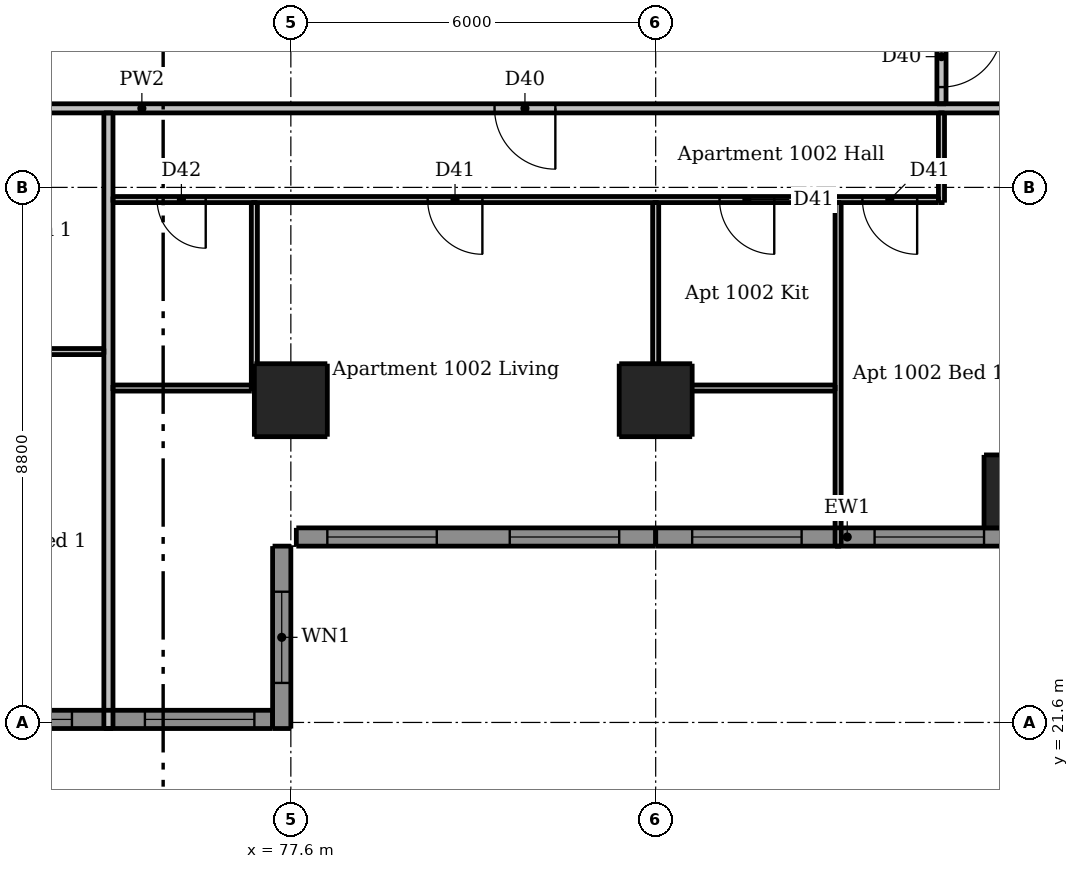
"""IFC4 building model, lengths in metres.
Left out: names, types, materials, properties, quantities, classifications, styles, units other than length and angle.
Written with IfcOpenShell. Run it as: python <this file> out.ifc"""

import sys

from ifc_helpers import new_model, si_unit, direction, frame, frame_2d, origin, origin_2d, place, context, subcontext, project, spatial, rectangle, extrude, element, fill, save


model = new_model("IFC4")
c1 = context("Model", 3, precision=1e-05, world=origin(), true_north=direction((0.0, 1.0)))
c2 = subcontext(c1, "Body", "Model", "MODEL_VIEW")
j1 = project(units=[si_unit("LENGTHUNIT", "METRE"), si_unit("PLANEANGLEUNIT", "RADIAN")], contexts=[c1])
p1 = place(None, origin())
s1 = spatial("IfcSite", under=j1, at=p1, CompositionType="ELEMENT")
p2 = place(p1, origin())
s2 = spatial("IfcBuilding", under=s1, at=p2, CompositionType="ELEMENT")
p3 = place(p2, frame((0.0, 0.0, 40.0)))
s3 = spatial("IfcBuildingStorey", under=s2, at=p3, CompositionType="ELEMENT", Elevation=40.0)
for number, where, z_axis, x_axis in (
    (1, (77.6, 26.9, 0.0), (0.0, 0.0, 1.0), (1.0, 0.0, 0.0)),
    (2, (83.6, 26.9, 0.0), (0.0, 0.0, 1.0), (1.0, 0.0, 0.0)),
    (3, (89.6, 25.4, 0.0), (0.0, 0.0, 1.0), (1.0, 0.0, 0.0)),
):
    element("IfcColumn", number, at=place(p3, frame(where, z_axis=z_axis, x_axis=x_axis)), inside=s3, PredefinedType="COLUMN", context=c2, shape_type="SweptSolid", body=[
        extrude(rectangle(XDim=1.2, YDim=1.2, at=origin_2d()), origin(), (0.0, 0.0, 1.0), 3.05),
    ])
p4 = place(p3, frame((77.45, 21.5, 0.0), z_axis=(0.0, 0.0, 1.0), x_axis=(0.0, 1.0, 0.0)))
e4 = element("IfcWall", 4, at=p4, inside=s3, PredefinedType="SOLIDWALL", context=c2, shape_type="SweptSolid", body=[
    extrude(rectangle(XDim=3.0, YDim=0.3, at=frame_2d((1.5, 0.0))), origin(), (0.0, 0.0, 1.0), 3.05),
])
p5 = place(p4, frame((0.75, 0.0, 0.9)))
e5 = element("IfcOpeningElement", 5, at=p5, cuts=e4, PredefinedType="OPENING", context=c2, shape_type="SweptSolid", body=[
    extrude(rectangle(XDim=1.5, YDim=1.5, at=frame_2d((0.75, 0.75))), frame((0.0, 0.16, 0.0), z_axis=(0.0, -1.0, 0.0), x_axis=(1.0, 0.0, 0.0)), (0.0, 0.0, 1.0), 0.32),
])
p6 = place(p3, frame((71.6, 21.65, 0.0), z_axis=(0.0, 0.0, 1.0), x_axis=(1.0, 0.0, 0.0)))
e6 = element("IfcWall", 6, at=p6, inside=s3, PredefinedType="SOLIDWALL", context=c2, shape_type="SweptSolid", body=[
    extrude(rectangle(XDim=5.7, YDim=0.3, at=frame_2d((2.85, 0.0))), origin(), (0.0, 0.0, 1.0), 3.05),
])
p7 = place(p6, frame((0.6, 0.0, 0.15)))
e7 = element("IfcOpeningElement", 7, at=p7, cuts=e6, PredefinedType="OPENING", context=c2, shape_type="SweptSolid", body=[
    extrude(rectangle(XDim=1.8, YDim=2.1, at=frame_2d((0.9, 1.05))), frame((0.0, 0.16, 0.0), z_axis=(0.0, -1.0, 0.0), x_axis=(1.0, 0.0, 0.0)), (0.0, 0.0, 1.0), 0.32),
])
p8 = place(p6, frame((3.6, 0.0, 0.15)))
e8 = element("IfcOpeningElement", 8, at=p8, cuts=e6, PredefinedType="OPENING", context=c2, shape_type="SweptSolid", body=[
    extrude(rectangle(XDim=1.8, YDim=2.1, at=frame_2d((0.9, 1.05))), frame((0.0, 0.16, 0.0), z_axis=(0.0, -1.0, 0.0), x_axis=(1.0, 0.0, 0.0)), (0.0, 0.0, 1.0), 0.32),
])
p9 = place(p3, frame((77.69, 24.65, 0.0), z_axis=(0.0, 0.0, 1.0), x_axis=(1.0, 0.0, 0.0)))
e9 = element("IfcWall", 9, at=p9, inside=s3, PredefinedType="SOLIDWALL", context=c2, shape_type="SweptSolid", body=[
    extrude(rectangle(XDim=5.91, YDim=0.3, at=frame_2d((2.955, 0.0))), origin(), (0.0, 0.0, 1.0), 3.05),
])
p10 = place(p9, frame((0.51, 0.0, 0.15)))
e10 = element("IfcOpeningElement", 10, at=p10, cuts=e9, PredefinedType="OPENING", context=c2, shape_type="SweptSolid", body=[
    extrude(rectangle(XDim=1.8, YDim=2.1, at=frame_2d((0.9, 1.05))), frame((0.0, 0.16, 0.0), z_axis=(0.0, -1.0, 0.0), x_axis=(1.0, 0.0, 0.0)), (0.0, 0.0, 1.0), 0.32),
])
p11 = place(p9, frame((3.51, 0.0, 0.15)))
e11 = element("IfcOpeningElement", 11, at=p11, cuts=e9, PredefinedType="OPENING", context=c2, shape_type="SweptSolid", body=[
    extrude(rectangle(XDim=1.8, YDim=2.1, at=frame_2d((0.9, 1.05))), frame((0.0, 0.16, 0.0), z_axis=(0.0, -1.0, 0.0), x_axis=(1.0, 0.0, 0.0)), (0.0, 0.0, 1.0), 0.32),
])
p12 = place(p3, frame((83.6, 24.65, 0.0), z_axis=(0.0, 0.0, 1.0), x_axis=(1.0, 0.0, 0.0)))
e12 = element("IfcWall", 12, at=p12, inside=s3, PredefinedType="SOLIDWALL", context=c2, shape_type="SweptSolid", body=[
    extrude(rectangle(XDim=6.3, YDim=0.3, at=frame_2d((3.15, 0.0))), origin(), (0.0, 0.0, 1.0), 3.05),
])
p13 = place(p12, frame((0.6, 0.0, 0.15)))
e13 = element("IfcOpeningElement", 13, at=p13, cuts=e12, PredefinedType="OPENING", context=c2, shape_type="SweptSolid", body=[
    extrude(rectangle(XDim=1.8, YDim=2.1, at=frame_2d((0.9, 1.05))), frame((0.0, 0.16, 0.0), z_axis=(0.0, -1.0, 0.0), x_axis=(1.0, 0.0, 0.0)), (0.0, 0.0, 1.0), 0.32),
])
p14 = place(p12, frame((3.6, 0.0, 0.15)))
e14 = element("IfcOpeningElement", 14, at=p14, cuts=e12, PredefinedType="OPENING", context=c2, shape_type="SweptSolid", body=[
    extrude(rectangle(XDim=1.8, YDim=2.1, at=frame_2d((0.9, 1.05))), frame((0.0, 0.16, 0.0), z_axis=(0.0, -1.0, 0.0), x_axis=(1.0, 0.0, 0.0)), (0.0, 0.0, 1.0), 0.32),
])
p15 = place(p3, frame((77.0, 27.05, 0.0), z_axis=(0.0, 0.0, 1.0), x_axis=(0.0, 1.0, 0.0)))
e15 = element("IfcWall", 15, at=p15, inside=s3, PredefinedType="PARTITIONING", context=c2, shape_type="SweptSolid", body=[
    extrude(rectangle(XDim=3.1, YDim=0.1, at=frame_2d((1.55, 0.0))), origin(), (0.0, 0.0, 1.0), 3.05),
])
p16 = place(p3, frame((83.6, 27.05, 0.0), z_axis=(0.0, 0.0, 1.0), x_axis=(0.0, 1.0, 0.0)))
e16 = element("IfcWall", 16, at=p16, inside=s3, PredefinedType="PARTITIONING", context=c2, shape_type="SweptSolid", body=[
    extrude(rectangle(XDim=3.1, YDim=0.1, at=frame_2d((1.55, 0.0))), origin(), (0.0, 0.0, 1.0), 2.647),
])
p17 = place(p3, frame((86.6, 24.5, 0.0), z_axis=(0.0, 0.0, 1.0), x_axis=(0.0, 1.0, 0.0)))
e17 = element("IfcWall", 17, at=p17, inside=s3, PredefinedType="PARTITIONING", context=c2, shape_type="SweptSolid", body=[
    extrude(rectangle(XDim=5.65, YDim=0.1, at=frame_2d((2.825, 0.0))), origin(), (0.0, 0.0, 1.0), 3.05),
])
p18 = place(p3, frame((88.3, 30.15, 0.0), z_axis=(0.0, 0.0, 1.0), x_axis=(0.0, 1.0, 0.0)))
e18 = element("IfcWall", 18, at=p18, inside=s3, PredefinedType="PARTITIONING", context=c2, shape_type="SweptSolid", body=[
    extrude(rectangle(XDim=1.475, YDim=0.1, at=frame_2d((0.738, 0.0))), origin(), (0.0, 0.0, 1.0), 3.05),
])
p19 = place(p3, frame((88.25, 30.2, 0.0), z_axis=(0.0, 0.0, 1.0), x_axis=(-1.0, 0.0, 0.0)))
e19 = element("IfcWall", 19, at=p19, inside=s3, PredefinedType="PARTITIONING", context=c2, shape_type="SweptSolid", body=[
    extrude(rectangle(XDim=13.575, YDim=0.1, at=frame_2d((6.788, 0.0))), origin(), (0.0, 0.0, 1.0), 3.05),
])
p20 = place(p19, frame((7.5, 0.0, 0.0)))
e20 = element("IfcOpeningElement", 20, at=p20, cuts=e19, PredefinedType="OPENING", context=c2, shape_type="SweptSolid", body=[
    extrude(rectangle(XDim=0.9, YDim=2.1, at=frame_2d((0.45, 1.05))), frame((0.0, 0.06, 0.0), z_axis=(0.0, -1.0, 0.0), x_axis=(1.0, 0.0, 0.0)), (0.0, 0.0, 1.0), 0.12),
])
p21 = place(p19, frame((2.7, 0.0, 0.0)))
e21 = element("IfcOpeningElement", 21, at=p21, cuts=e19, PredefinedType="OPENING", context=c2, shape_type="SweptSolid", body=[
    extrude(rectangle(XDim=0.9, YDim=2.1, at=frame_2d((0.45, 1.05))), frame((0.0, 0.06, 0.0), z_axis=(0.0, -1.0, 0.0), x_axis=(1.0, 0.0, 0.0)), (0.0, 0.0, 1.0), 0.12),
])
p22 = place(p19, frame((0.35, 0.0, 0.0)))
e22 = element("IfcOpeningElement", 22, at=p22, cuts=e19, PredefinedType="OPENING", context=c2, shape_type="SweptSolid", body=[
    extrude(rectangle(XDim=0.9, YDim=2.1, at=frame_2d((0.45, 1.05))), frame((0.0, 0.06, 0.0), z_axis=(0.0, -1.0, 0.0), x_axis=(1.0, 0.0, 0.0)), (0.0, 0.0, 1.0), 0.12),
])
p23 = place(p19, frame((12.05, 0.0, 0.0)))
e23 = element("IfcOpeningElement", 23, at=p23, cuts=e19, PredefinedType="OPENING", context=c2, shape_type="SweptSolid", body=[
    extrude(rectangle(XDim=0.8, YDim=2.1, at=frame_2d((0.4, 1.05))), frame((0.0, 0.06, 0.0), z_axis=(0.0, -1.0, 0.0), x_axis=(1.0, 0.0, 0.0)), (0.0, 0.0, 1.0), 0.12),
])
p24 = place(p3, frame((68.45, 27.7, 0.0), z_axis=(0.0, 0.0, 1.0), x_axis=(1.0, 0.0, 0.0)))
e24 = element("IfcWall", 24, at=p24, inside=s3, PredefinedType="PARTITIONING", context=c2, shape_type="SweptSolid", body=[
    extrude(rectangle(XDim=6.075, YDim=0.1, at=frame_2d((3.038, 0.0))), origin(), (0.0, 0.0, 1.0), 3.05),
])
p25 = place(p24, frame((3.85, 0.0, 0.0)))
e25 = element("IfcOpeningElement", 25, at=p25, cuts=e24, PredefinedType="OPENING", context=c2, shape_type="SweptSolid", body=[
    extrude(rectangle(XDim=0.8, YDim=2.1, at=frame_2d((0.4, 1.05))), frame((0.0, 0.06, 0.0), z_axis=(0.0, -1.0, 0.0), x_axis=(1.0, 0.0, 0.0)), (0.0, 0.0, 1.0), 0.12),
])
p26 = place(p3, frame((74.675, 27.1, 0.0), z_axis=(0.0, 0.0, 1.0), x_axis=(1.0, 0.0, 0.0)))
e26 = element("IfcWall", 26, at=p26, inside=s3, PredefinedType="PARTITIONING", context=c2, shape_type="SweptSolid", body=[
    extrude(rectangle(XDim=2.275, YDim=0.1, at=frame_2d((1.137, 0.0))), origin(), (0.0, 0.0, 1.0), 3.05),
])
p27 = place(p3, frame((83.65, 27.1, 0.0), z_axis=(0.0, 0.0, 1.0), x_axis=(1.0, 0.0, 0.0)))
e27 = element("IfcWall", 27, at=p27, inside=s3, PredefinedType="PARTITIONING", context=c2, shape_type="SweptSolid", body=[
    extrude(rectangle(XDim=2.9, YDim=0.1, at=frame_2d((1.45, 0.0))), origin(), (0.0, 0.0, 1.0), 3.05),
])
p28 = place(p3, frame((74.6, 21.5, 0.0), z_axis=(0.0, 0.0, 1.0), x_axis=(0.0, 1.0, 0.0)))
e28 = element("IfcWall", 28, at=p28, inside=s3, PredefinedType="PARTITIONING", context=c2, shape_type="SweptSolid", body=[
    extrude(rectangle(XDim=10.125, YDim=0.15, at=frame_2d((5.062, 0.0))), origin(), (0.0, 0.0, 1.0), 3.05),
])
p29 = place(p3, frame((88.3, 60.475, 0.0), z_axis=(0.0, 0.0, 1.0), x_axis=(0.0, -1.0, 0.0)))
e29 = element("IfcWall", 29, at=p29, inside=s3, PredefinedType="PARTITIONING", context=c2, shape_type="SweptSolid", body=[
    extrude(rectangle(XDim=28.7, YDim=0.15, at=frame_2d((14.35, 0.0))), origin(), (0.0, 0.0, 1.0), 3.05),
])
p30 = place(p29, frame((27.425, 0.0, 0.0)))
e30 = element("IfcOpeningElement", 30, at=p30, cuts=e29, PredefinedType="OPENING", context=c2, shape_type="SweptSolid", body=[
    extrude(rectangle(XDim=1.0, YDim=2.1, at=frame_2d((0.5, 1.05))), frame((0.0, 0.085, 0.0), z_axis=(0.0, -1.0, 0.0), x_axis=(1.0, 0.0, 0.0)), (0.0, 0.0, 1.0), 0.17),
])
p31 = place(p29, frame((10.625, 0.0, 0.0)))
e31 = element("IfcOpeningElement", 31, at=p31, cuts=e29, PredefinedType="OPENING", context=c2, shape_type="SweptSolid", body=[
    extrude(rectangle(XDim=1.0, YDim=2.1, at=frame_2d((0.5, 1.05))), frame((0.0, 0.085, 0.0), z_axis=(0.0, -1.0, 0.0), x_axis=(1.0, 0.0, 0.0)), (0.0, 0.0, 1.0), 0.17),
])
p32 = place(p3, frame((89.525, 31.7, 0.0), z_axis=(0.0, 0.0, 1.0), x_axis=(-1.0, 0.0, 0.0)))
e32 = element("IfcWall", 32, at=p32, inside=s3, PredefinedType="PARTITIONING", context=c2, shape_type="SweptSolid", body=[
    extrude(rectangle(XDim=28.75, YDim=0.15, at=frame_2d((14.375, 0.0))), origin(), (0.0, 0.0, 1.0), 3.05),
])
p33 = place(p32, frame((24.475, 0.0, 0.0)))
e33 = element("IfcOpeningElement", 33, at=p33, cuts=e32, PredefinedType="OPENING", context=c2, shape_type="SweptSolid", body=[
    extrude(rectangle(XDim=1.0, YDim=2.1, at=frame_2d((0.5, 1.05))), frame((0.0, 0.085, 0.0), z_axis=(0.0, -1.0, 0.0), x_axis=(1.0, 0.0, 0.0)), (0.0, 0.0, 1.0), 0.17),
])
p34 = place(p32, frame((7.575, 0.0, 0.0)))
e34 = element("IfcOpeningElement", 34, at=p34, cuts=e32, PredefinedType="OPENING", context=c2, shape_type="SweptSolid", body=[
    extrude(rectangle(XDim=1.0, YDim=2.1, at=frame_2d((0.5, 1.05))), frame((0.0, 0.085, 0.0), z_axis=(0.0, -1.0, 0.0), x_axis=(1.0, 0.0, 0.0)), (0.0, 0.0, 1.0), 0.17),
])
p35 = place(p5, origin())
e35 = element("IfcWindow", 35, at=p35, inside=s3, PartitioningType="DOUBLE_PANEL_VERTICAL", PredefinedType="WINDOW", context=c2, shape_type="SweptSolid", body=[
    extrude(rectangle(XDim=1.5, YDim=1.5, at=frame_2d((0.75, 0.75))), frame((0.0, 0.03, 0.0), z_axis=(0.0, -1.0, 0.0), x_axis=(1.0, 0.0, 0.0)), (0.0, 0.0, 1.0), 0.06),
])
fill(e5, e35)
p36 = place(p7, origin())
e36 = element("IfcWindow", 36, at=p36, inside=s3, PartitioningType="DOUBLE_PANEL_VERTICAL", PredefinedType="WINDOW", context=c2, shape_type="SweptSolid", body=[
    extrude(rectangle(XDim=1.8, YDim=2.1, at=frame_2d((0.9, 1.05))), frame((0.0, 0.03, 0.0), z_axis=(0.0, -1.0, 0.0), x_axis=(1.0, 0.0, 0.0)), (0.0, 0.0, 1.0), 0.06),
])
fill(e7, e36)
p37 = place(p8, origin())
e37 = element("IfcWindow", 37, at=p37, inside=s3, PartitioningType="DOUBLE_PANEL_VERTICAL", PredefinedType="WINDOW", context=c2, shape_type="SweptSolid", body=[
    extrude(rectangle(XDim=1.8, YDim=2.1, at=frame_2d((0.9, 1.05))), frame((0.0, 0.03, 0.0), z_axis=(0.0, -1.0, 0.0), x_axis=(1.0, 0.0, 0.0)), (0.0, 0.0, 1.0), 0.06),
])
fill(e8, e37)
p38 = place(p10, origin())
e38 = element("IfcWindow", 38, at=p38, inside=s3, PartitioningType="DOUBLE_PANEL_VERTICAL", PredefinedType="WINDOW", context=c2, shape_type="SweptSolid", body=[
    extrude(rectangle(XDim=1.8, YDim=2.1, at=frame_2d((0.9, 1.05))), frame((0.0, 0.03, 0.0), z_axis=(0.0, -1.0, 0.0), x_axis=(1.0, 0.0, 0.0)), (0.0, 0.0, 1.0), 0.06),
])
fill(e10, e38)
p39 = place(p11, origin())
e39 = element("IfcWindow", 39, at=p39, inside=s3, PartitioningType="DOUBLE_PANEL_VERTICAL", PredefinedType="WINDOW", context=c2, shape_type="SweptSolid", body=[
    extrude(rectangle(XDim=1.8, YDim=2.1, at=frame_2d((0.9, 1.05))), frame((0.0, 0.03, 0.0), z_axis=(0.0, -1.0, 0.0), x_axis=(1.0, 0.0, 0.0)), (0.0, 0.0, 1.0), 0.06),
])
fill(e11, e39)
p40 = place(p13, origin())
e40 = element("IfcWindow", 40, at=p40, inside=s3, PartitioningType="DOUBLE_PANEL_VERTICAL", PredefinedType="WINDOW", context=c2, shape_type="SweptSolid", body=[
    extrude(rectangle(XDim=1.8, YDim=2.1, at=frame_2d((0.9, 1.05))), frame((0.0, 0.03, 0.0), z_axis=(0.0, -1.0, 0.0), x_axis=(1.0, 0.0, 0.0)), (0.0, 0.0, 1.0), 0.06),
])
fill(e13, e40)
p41 = place(p14, origin())
e41 = element("IfcWindow", 41, at=p41, inside=s3, PartitioningType="DOUBLE_PANEL_VERTICAL", PredefinedType="WINDOW", context=c2, shape_type="SweptSolid", body=[
    extrude(rectangle(XDim=1.8, YDim=2.1, at=frame_2d((0.9, 1.05))), frame((0.0, 0.03, 0.0), z_axis=(0.0, -1.0, 0.0), x_axis=(1.0, 0.0, 0.0)), (0.0, 0.0, 1.0), 0.06),
])
fill(e14, e41)
p42 = place(p34, origin())
e42 = element("IfcDoor", 42, at=p42, inside=s3, OperationType="SINGLE_SWING_LEFT", PredefinedType="DOOR", context=c2, shape_type="SweptSolid", body=[
    extrude(rectangle(XDim=1.0, YDim=2.1, at=frame_2d((0.5, 1.05))), frame((0.0, 0.025, 0.0), z_axis=(0.0, -1.0, 0.0), x_axis=(1.0, 0.0, 0.0)), (0.0, 0.0, 1.0), 0.05),
])
fill(e34, e42)
p43 = place(p20, origin())
e43 = element("IfcDoor", 43, at=p43, inside=s3, OperationType="SINGLE_SWING_LEFT", PredefinedType="DOOR", context=c2, shape_type="SweptSolid", body=[
    extrude(rectangle(XDim=0.9, YDim=2.1, at=frame_2d((0.45, 1.05))), frame((0.0, 0.025, 0.0), z_axis=(0.0, -1.0, 0.0), x_axis=(1.0, 0.0, 0.0)), (0.0, 0.0, 1.0), 0.05),
])
fill(e20, e43)
p44 = place(p21, origin())
e44 = element("IfcDoor", 44, at=p44, inside=s3, OperationType="SINGLE_SWING_LEFT", PredefinedType="DOOR", context=c2, shape_type="SweptSolid", body=[
    extrude(rectangle(XDim=0.9, YDim=2.1, at=frame_2d((0.45, 1.05))), frame((0.0, 0.025, 0.0), z_axis=(0.0, -1.0, 0.0), x_axis=(1.0, 0.0, 0.0)), (0.0, 0.0, 1.0), 0.05),
])
fill(e21, e44)
p45 = place(p22, origin())
e45 = element("IfcDoor", 45, at=p45, inside=s3, OperationType="SINGLE_SWING_LEFT", PredefinedType="DOOR", context=c2, shape_type="SweptSolid", body=[
    extrude(rectangle(XDim=0.9, YDim=2.1, at=frame_2d((0.45, 1.05))), frame((0.0, 0.025, 0.0), z_axis=(0.0, -1.0, 0.0), x_axis=(1.0, 0.0, 0.0)), (0.0, 0.0, 1.0), 0.05),
])
fill(e22, e45)
p46 = place(p23, origin())
e46 = element("IfcDoor", 46, at=p46, inside=s3, OperationType="SINGLE_SWING_LEFT", PredefinedType="DOOR", context=c2, shape_type="SweptSolid", body=[
    extrude(rectangle(XDim=0.8, YDim=2.1, at=frame_2d((0.4, 1.05))), frame((0.0, 0.025, 0.0), z_axis=(0.0, -1.0, 0.0), x_axis=(1.0, 0.0, 0.0)), (0.0, 0.0, 1.0), 0.05),
])
fill(e23, e46)
p47 = place(p30, origin())
e47 = element("IfcDoor", 47, at=p47, inside=s3, OperationType="SINGLE_SWING_LEFT", PredefinedType="DOOR", context=c2, shape_type="SweptSolid", body=[
    extrude(rectangle(XDim=1.0, YDim=2.1, at=frame_2d((0.5, 1.05))), frame((0.0, 0.025, 0.0), z_axis=(0.0, -1.0, 0.0), x_axis=(1.0, 0.0, 0.0)), (0.0, 0.0, 1.0), 0.05),
])
fill(e30, e47)
save(model, sys.argv[1])
